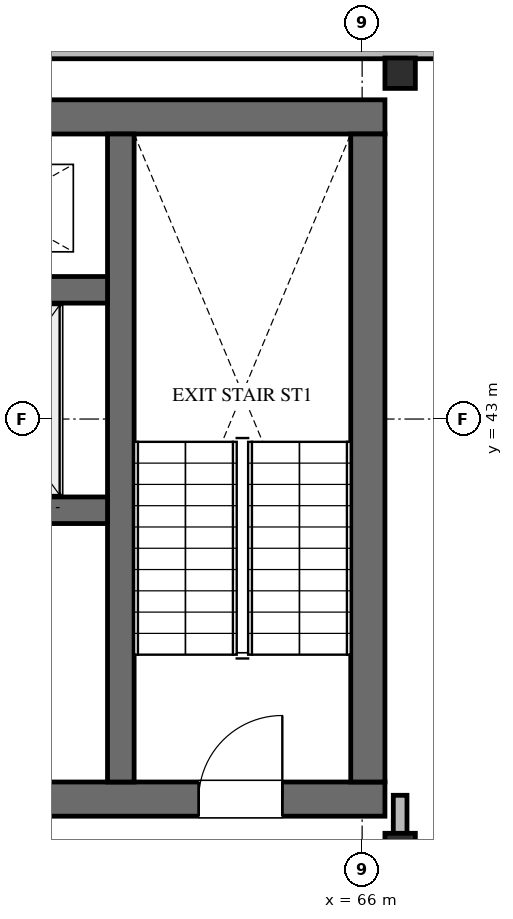
"""IFC4 building model, lengths in metres.
Left out: names, types, materials, properties, quantities, classifications, styles, units other than length and angle.
Written with IfcOpenShell. Run it as: python <this file> out.ifc"""

import sys

from ifc_helpers import new_model, si_unit, direction, frame, frame_2d, origin, origin_2d, place, context, subcontext, project, spatial, rectangle, hollow_rectangle, extrude, element, fill, save


model = new_model("IFC4")
c1 = context("Model", 3, precision=1e-05, world=origin(), true_north=direction((0.0, 1.0)))
c2 = subcontext(c1, "Body", "Model", "MODEL_VIEW")
j1 = project(units=[si_unit("LENGTHUNIT", "METRE"), si_unit("PLANEANGLEUNIT", "RADIAN")], contexts=[c1])
p1 = place(None, origin())
s1 = spatial("IfcSite", under=j1, at=p1, CompositionType="ELEMENT")
p2 = place(p1, origin())
s2 = spatial("IfcBuilding", under=s1, at=p2, CompositionType="ELEMENT")
p3 = place(p2, frame((0.0, 0.0, 319.2)))
s3 = spatial("IfcBuildingStorey", under=s2, at=p3, CompositionType="ELEMENT", Elevation=319.2)
p4 = place(p3, frame((55.8, 46.975, 0.0), z_axis=(0.0, 0.0, 1.0), x_axis=(1.0, 0.0, 0.0)))
e1 = element("IfcWall", 1, at=p4, inside=s3, PredefinedType="SHEAR", context=c2, shape_type="SweptSolid", body=[
    extrude(rectangle(XDim=10.5, YDim=0.45, at=frame_2d((5.25, 0.0))), origin(), (0.0, 0.0, 1.0), 3.6),
])
p5 = place(p3, frame((55.8, 38.0, 0.0), z_axis=(0.0, 0.0, 1.0), x_axis=(1.0, 0.0, 0.0)))
e2 = element("IfcWall", 2, at=p5, inside=s3, PredefinedType="SHEAR", context=c2, shape_type="SweptSolid", body=[
    extrude(rectangle(XDim=10.5, YDim=0.45, at=frame_2d((5.25, 0.0))), origin(), (0.0, 0.0, 1.0), 3.6),
])
p6 = place(p5, frame((1.5, 0.0, 0.0)))
e3 = element("IfcOpeningElement", 3, at=p6, cuts=e2, PredefinedType="OPENING", context=c2, shape_type="SweptSolid", body=[
    extrude(rectangle(XDim=1.1, YDim=2.2, at=frame_2d((0.55, 1.1))), frame((0.0, 0.235, 0.0), z_axis=(0.0, -1.0, 0.0), x_axis=(1.0, 0.0, 0.0)), (0.0, 0.0, 1.0), 0.47),
])
p7 = place(p5, frame((4.82, 0.0, 0.0)))
e4 = element("IfcOpeningElement", 4, at=p7, cuts=e2, PredefinedType="OPENING", context=c2, shape_type="SweptSolid", body=[
    extrude(rectangle(XDim=1.0, YDim=2.15, at=frame_2d((0.5, 1.075))), frame((0.0, 0.235, 0.0), z_axis=(0.0, -1.0, 0.0), x_axis=(1.0, 0.0, 0.0)), (0.0, 0.0, 1.0), 0.47),
])
p8 = place(p5, frame((8.05, 0.0, 0.0)))
e5 = element("IfcOpeningElement", 5, at=p8, cuts=e2, PredefinedType="OPENING", context=c2, shape_type="SweptSolid", body=[
    extrude(rectangle(XDim=1.1, YDim=2.2, at=frame_2d((0.55, 1.1))), frame((0.0, 0.235, 0.0), z_axis=(0.0, -1.0, 0.0), x_axis=(1.0, 0.0, 0.0)), (0.0, 0.0, 1.0), 0.47),
])
p9 = place(p3, frame((66.075, 38.225, 0.0), z_axis=(0.0, 0.0, 1.0), x_axis=(0.0, 1.0, 0.0)))
e6 = element("IfcWall", 6, at=p9, inside=s3, PredefinedType="SHEAR", context=c2, shape_type="SweptSolid", body=[
    extrude(rectangle(XDim=8.525, YDim=0.45, at=frame_2d((4.262, 0.0))), origin(), (0.0, 0.0, 1.0), 3.6),
])
p10 = place(p3, frame((62.825, 38.225, 0.0), z_axis=(0.0, 0.0, 1.0), x_axis=(0.0, 1.0, 0.0)))
e7 = element("IfcWall", 7, at=p10, inside=s3, PredefinedType="SHEAR", context=c2, shape_type="SweptSolid", body=[
    extrude(rectangle(XDim=8.525, YDim=0.35, at=frame_2d((4.262, 0.0))), origin(), (0.0, 0.0, 1.0), 3.6),
])
p11 = place(p3, frame((59.6, 41.8, 0.0), z_axis=(0.0, 0.0, 1.0), x_axis=(1.0, 0.0, 0.0)))
e8 = element("IfcWall", 8, at=p11, inside=s3, PredefinedType="SHEAR", context=c2, shape_type="SweptSolid", body=[
    extrude(rectangle(XDim=3.05, YDim=0.35, at=frame_2d((1.525, 0.0))), origin(), (0.0, 0.0, 1.0), 3.6),
])
p12 = place(p11, frame((0.92, 0.0, 0.0)))
e9 = element("IfcOpeningElement", 9, at=p12, cuts=e8, PredefinedType="OPENING", context=c2, shape_type="SweptSolid", body=[
    extrude(rectangle(XDim=1.2, YDim=2.2, at=frame_2d((0.6, 1.1))), frame((0.0, 0.185, 0.0), z_axis=(0.0, -1.0, 0.0), x_axis=(1.0, 0.0, 0.0)), (0.0, 0.0, 1.0), 0.37),
])
p13 = place(p3, frame((59.6, 44.7, 0.0), z_axis=(0.0, 0.0, 1.0), x_axis=(1.0, 0.0, 0.0)))
e10 = element("IfcWall", 10, at=p13, inside=s3, PredefinedType="SHEAR", context=c2, shape_type="SweptSolid", body=[
    extrude(rectangle(XDim=3.05, YDim=0.35, at=frame_2d((1.525, 0.0))), origin(), (0.0, 0.0, 1.0), 3.6),
])
for number, where, z_axis, x_axis in (
    (11, (66.5, 47.55, 0.0), (0.0, 0.0, 1.0), (1.0, 0.0, 0.0)),
    (12, (66.5, 37.35, 0.0), (0.0, 0.0, 1.0), (1.0, 0.0, 0.0)),
):
    element("IfcColumn", number, at=place(p3, frame(where, z_axis=z_axis, x_axis=x_axis)), inside=s3, PredefinedType="COLUMN", context=c2, shape_type="SweptSolid", body=[
        extrude(hollow_rectangle(XDim=0.4, YDim=0.4, WallThickness=0.016, at=origin_2d()), origin(), (0.0, 0.0, 1.0), 3.6),
    ])
p14 = place(p3, frame((46.158, 47.86, 0.0), z_axis=(0.0, 0.0, 1.0), x_axis=(1.0, 0.0, 0.0)))
e13 = element("IfcWall", 13, at=p14, inside=s3, PredefinedType="STANDARD", context=c2, shape_type="SweptSolid", body=[
    extrude(rectangle(XDim=21.181, YDim=0.24, at=frame_2d((10.591, 0.0))), origin(), (0.0, 0.0, 1.0), 2.709),
])
p15 = place(p3, frame((66.5, 34.468, 0.0), z_axis=(0.0, 0.0, 1.0), x_axis=(0.0, 1.0, 0.0)))
e14 = element("IfcWall", 14, at=p15, inside=s3, PredefinedType="STANDARD", context=c2, shape_type="SweptSolid", body=[
    extrude(rectangle(XDim=3.582, YDim=0.18, at=frame_2d((1.791, 0.0))), origin(), (0.0, 0.0, 1.0), 2.709),
])
p16 = place(p8, origin())
e15 = element("IfcDoor", 15, at=p16, inside=s3, OperationType="SINGLE_SWING_RIGHT", PredefinedType="DOOR", context=c2, shape_type="SweptSolid", body=[
    extrude(rectangle(XDim=1.1, YDim=2.2, at=frame_2d((0.55, 1.1))), frame((0.0, 0.025, 0.0), z_axis=(0.0, -1.0, 0.0), x_axis=(1.0, 0.0, 0.0)), (0.0, 0.0, 1.0), 0.05),
])
fill(e5, e15)
save(model, sys.argv[1])
